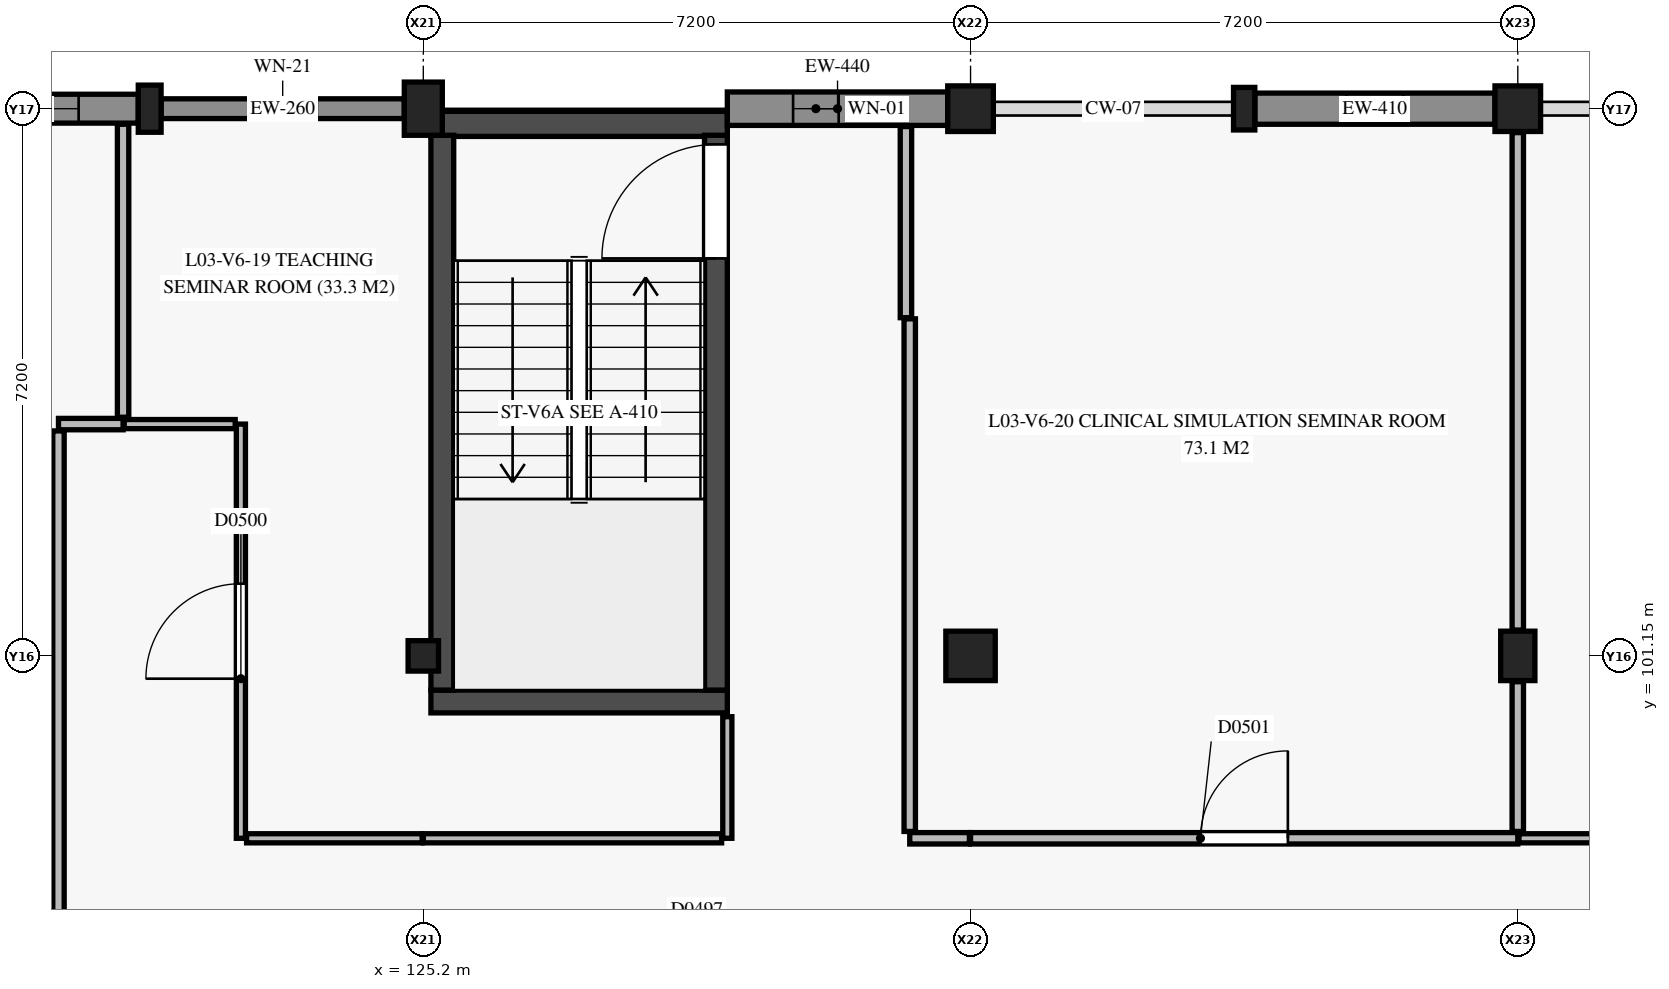
"""IFC4 building model, lengths in metres.
Left out: names, types, materials, properties, quantities, classifications, styles, units other than length and angle.
Written with IfcOpenShell. Run it as: python <this file> out.ifc"""

import sys

from ifc_helpers import new_model, si_unit, direction, frame, frame_2d, origin, origin_2d, place, context, subcontext, project, spatial, rectangle, circle, extrude, element, fill, save


model = new_model("IFC4")
c1 = context("Model", 3, precision=1e-05, world=origin(), true_north=direction((0.0, 1.0)))
c2 = subcontext(c1, "Body", "Model", "MODEL_VIEW")
j1 = project(units=[si_unit("LENGTHUNIT", "METRE"), si_unit("PLANEANGLEUNIT", "RADIAN")], contexts=[c1])
p1 = place(None, origin())
s1 = spatial("IfcSite", under=j1, at=p1, CompositionType="ELEMENT")
p2 = place(p1, origin())
s2 = spatial("IfcBuilding", under=s1, at=p2, CompositionType="ELEMENT")
p3 = place(p2, frame((0.0, 0.0, 13.2)))
s3 = spatial("IfcBuildingStorey", under=s2, at=p3, CompositionType="ELEMENT", Elevation=13.2)
p4 = place(p3, frame((125.2, 101.15, 0.0), z_axis=(0.0, 0.0, 1.0), x_axis=(1.0, 0.0, 0.0)))
e1 = element("IfcColumn", 1, at=p4, inside=s3, PredefinedType="COLUMN", context=c2, shape_type="SweptSolid", body=[
    extrude(rectangle(XDim=0.4, YDim=0.4, at=origin_2d()), origin(), (0.0, 0.0, 1.0), 4.2),
])
p5 = place(p3, frame((125.2, 108.35, 0.0), z_axis=(0.0, 0.0, 1.0), x_axis=(1.0, 0.0, 0.0)))
e2 = element("IfcColumn", 2, at=p5, inside=s3, PredefinedType="COLUMN", context=c2, shape_type="SweptSolid", body=[
    extrude(rectangle(XDim=0.5, YDim=0.7, at=origin_2d()), origin(), (0.0, 0.0, 1.0), 4.2),
])
p6 = place(p3, frame((132.4, 101.15, 0.0), z_axis=(0.0, 0.0, 1.0), x_axis=(1.0, 0.0, 0.0)))
e3 = element("IfcColumn", 3, at=p6, inside=s3, PredefinedType="COLUMN", context=c2, shape_type="SweptSolid", body=[
    extrude(rectangle(XDim=0.65, YDim=0.65, at=origin_2d()), origin(), (0.0, 0.0, 1.0), 4.2),
])
p7 = place(p3, frame((132.4, 108.35, 0.0), z_axis=(0.0, 0.0, 1.0), x_axis=(1.0, 0.0, 0.0)))
e4 = element("IfcColumn", 4, at=p7, inside=s3, PredefinedType="COLUMN", context=c2, shape_type="SweptSolid", body=[
    extrude(rectangle(XDim=0.6, YDim=0.6, at=origin_2d()), origin(), (0.0, 0.0, 1.0), 4.2),
])
p8 = place(p3, frame((139.6, 101.15, 0.0), z_axis=(0.0, 0.0, 1.0), x_axis=(1.0, 0.0, 0.0)))
e5 = element("IfcColumn", 5, at=p8, inside=s3, PredefinedType="COLUMN", context=c2, shape_type="SweptSolid", body=[
    extrude(rectangle(XDim=0.45, YDim=0.65, at=origin_2d()), origin(), (0.0, 0.0, 1.0), 4.05),
])
p9 = place(p3, frame((139.6, 108.35, 0.0), z_axis=(0.0, 0.0, 1.0), x_axis=(1.0, 0.0, 0.0)))
e6 = element("IfcColumn", 6, at=p9, inside=s3, PredefinedType="COLUMN", context=c2, shape_type="SweptSolid", body=[
    extrude(circle(Radius=0.3, at=origin_2d()), origin(), (0.0, 0.0, 1.0), 4.36),
])
p10 = place(p3, frame((121.6, 108.35, 0.0), z_axis=(0.0, 0.0, 1.0), x_axis=(1.0, 0.0, 0.0)))
e7 = element("IfcColumn", 7, at=p10, inside=s3, PredefinedType="PILASTER", context=c2, shape_type="SweptSolid", body=[
    extrude(rectangle(XDim=0.3, YDim=0.62, at=origin_2d()), origin(), (0.0, 0.0, 1.0), 4.2),
])
p11 = place(p3, frame((136.0, 108.35, 0.0), z_axis=(0.0, 0.0, 1.0), x_axis=(1.0, 0.0, 0.0)))
e8 = element("IfcColumn", 8, at=p11, inside=s3, PredefinedType="PILASTER", context=c2, shape_type="SweptSolid", body=[
    extrude(rectangle(XDim=0.28, YDim=0.56, at=origin_2d()), origin(), (0.0, 0.0, 1.0), 4.2),
])
p12 = place(p3, frame((125.3, 100.55, 0.0), z_axis=(0.0, 0.0, 1.0), x_axis=(1.0, 0.0, 0.0)))
e9 = element("IfcWall", 9, at=p12, inside=s3, PredefinedType="SHEAR", context=c2, shape_type="SweptSolid", body=[
    extrude(rectangle(XDim=3.9, YDim=0.3, at=frame_2d((1.95, 0.0))), origin(), (0.0, 0.0, 1.0), 3.95),
])
p13 = place(p3, frame((125.3, 108.15, 0.0), z_axis=(0.0, 0.0, 1.0), x_axis=(1.0, 0.0, 0.0)))
e10 = element("IfcWall", 10, at=p13, inside=s3, PredefinedType="SHEAR", context=c2, shape_type="SweptSolid", body=[
    extrude(rectangle(XDim=3.9, YDim=0.33, at=frame_2d((1.95, 0.0))), origin(), (0.0, 0.0, 1.0), 3.95),
])
p14 = place(p3, frame((125.45, 100.7, 0.0), z_axis=(0.0, 0.0, 1.0), x_axis=(0.0, 1.0, 0.0)))
e11 = element("IfcWall", 11, at=p14, inside=s3, PredefinedType="SHEAR", context=c2, shape_type="SweptSolid", body=[
    extrude(rectangle(XDim=7.3, YDim=0.3, at=frame_2d((3.65, 0.0))), origin(), (0.0, 0.0, 1.0), 3.95),
])
p15 = place(p3, frame((129.05, 100.7, 0.0), z_axis=(0.0, 0.0, 1.0), x_axis=(0.0, 1.0, 0.0)))
e12 = element("IfcWall", 12, at=p15, inside=s3, PredefinedType="SHEAR", context=c2, shape_type="SweptSolid", body=[
    extrude(rectangle(XDim=7.3, YDim=0.3, at=frame_2d((3.65, 0.0))), origin(), (0.0, 0.0, 1.0), 3.95),
])
p16 = place(p15, frame((5.68, 0.0, 0.0)))
e13 = element("IfcOpeningElement", 13, at=p16, cuts=e12, PredefinedType="OPENING", context=c2, shape_type="SweptSolid", body=[
    extrude(rectangle(XDim=1.5, YDim=2.15, at=frame_2d((0.75, 1.075))), frame((0.0, 0.16, 0.0), z_axis=(0.0, -1.0, 0.0), x_axis=(1.0, 0.0, 0.0)), (0.0, 0.0, 1.0), 0.32),
])
p17 = place(p3, frame((118.3, 108.35, 0.0), z_axis=(0.0, 0.0, 1.0), x_axis=(1.0, 0.0, 0.0)))
e14 = element("IfcWall", 14, at=p17, inside=s3, PredefinedType="USERDEFINED", context=c2, shape_type="SweptSolid", body=[
    extrude(rectangle(XDim=3.15, YDim=0.38, at=frame_2d((1.575, 0.0))), origin(), (0.0, 0.0, 1.0), 3.13),
])
p18 = place(p17, frame((0.565, 0.0, 0.9)))
e15 = element("IfcOpeningElement", 15, at=p18, cuts=e14, PredefinedType="OPENING", context=c2, shape_type="SweptSolid", body=[
    extrude(rectangle(XDim=1.8, YDim=0.9, at=frame_2d((0.9, 0.45))), frame((0.0, 0.2, 0.0), z_axis=(0.0, -1.0, 0.0), x_axis=(1.0, 0.0, 0.0)), (0.0, 0.0, 1.0), 0.4),
])
p19 = place(p3, frame((121.75, 108.35, 0.0), z_axis=(0.0, 0.0, 1.0), x_axis=(1.0, 0.0, 0.0)))
e16 = element("IfcWall", 16, at=p19, inside=s3, PredefinedType="SOLIDWALL", context=c2, shape_type="SweptSolid", body=[
    extrude(rectangle(XDim=3.2, YDim=0.26, at=frame_2d((1.6, 0.0))), origin(), (0.0, 0.0, 1.0), 3.13),
])
p20 = place(p19, frame((1.15, 0.0, 0.95)))
e17 = element("IfcOpeningElement", 17, at=p20, cuts=e16, PredefinedType="OPENING", context=c2, shape_type="SweptSolid", body=[
    extrude(rectangle(XDim=0.9, YDim=1.2, at=frame_2d((0.45, 0.6))), frame((0.0, 0.14, 0.0), z_axis=(0.0, -1.0, 0.0), x_axis=(1.0, 0.0, 0.0)), (0.0, 0.0, 1.0), 0.28),
])
p21 = place(p3, frame((129.2, 108.35, 0.0), z_axis=(0.0, 0.0, 1.0), x_axis=(1.0, 0.0, 0.0)))
e18 = element("IfcWall", 18, at=p21, inside=s3, PredefinedType="USERDEFINED", context=c2, shape_type="SweptSolid", body=[
    extrude(rectangle(XDim=2.9, YDim=0.44, at=frame_2d((1.45, 0.0))), origin(), (0.0, 0.0, 1.0), 3.13),
])
p22 = place(p21, frame((0.865, 0.0, 0.9)))
e19 = element("IfcOpeningElement", 19, at=p22, cuts=e18, PredefinedType="OPENING", context=c2, shape_type="SweptSolid", body=[
    extrude(rectangle(XDim=0.6, YDim=1.8, at=frame_2d((0.3, 0.9))), frame((0.0, 0.23, 0.0), z_axis=(0.0, -1.0, 0.0), x_axis=(1.0, 0.0, 0.0)), (0.0, 0.0, 1.0), 0.46),
])
p23 = place(p3, frame((136.14, 108.35, 0.0), z_axis=(0.0, 0.0, 1.0), x_axis=(1.0, 0.0, 0.0)))
e20 = element("IfcWall", 20, at=p23, inside=s3, PredefinedType="USERDEFINED", context=c2, shape_type="SweptSolid", body=[
    extrude(rectangle(XDim=3.16, YDim=0.41, at=frame_2d((1.58, 0.0))), origin(), (0.0, 0.0, 1.0), 3.13),
])
p24 = place(p23, frame((1.205, 0.0, 0.9)))
e21 = element("IfcOpeningElement", 21, at=p24, cuts=e20, PredefinedType="OPENING", context=c2, shape_type="SweptSolid", body=[
    extrude(rectangle(XDim=0.75, YDim=1.8, at=frame_2d((0.375, 0.9))), frame((0.0, 0.215, 0.0), z_axis=(0.0, -1.0, 0.0), x_axis=(1.0, 0.0, 0.0)), (0.0, 0.0, 1.0), 0.43),
])
p25 = place(p3, frame((120.4, 104.2, 0.0), z_axis=(0.0, 0.0, 1.0), x_axis=(1.0, 0.0, 0.0)))
e22 = element("IfcWall", 22, at=p25, inside=s3, PredefinedType="PARTITIONING", context=c2, shape_type="SweptSolid", body=[
    extrude(rectangle(XDim=0.85, YDim=0.15, at=frame_2d((0.425, 0.0))), origin(), (0.0, 0.0, 1.0), 3.95),
])
p26 = place(p3, frame((120.4, 87.1, 0.0), z_axis=(0.0, 0.0, 1.0), x_axis=(0.0, 1.0, 0.0)))
e23 = element("IfcWall", 23, at=p26, inside=s3, PredefinedType="PARTITIONING", context=c2, shape_type="SweptSolid", body=[
    extrude(rectangle(XDim=17.01, YDim=0.15, at=frame_2d((8.505, 0.0))), origin(), (0.0, 0.0, 1.0), 3.215),
])
p27 = place(p26, frame((7.93, 0.0, 0.0)))
e24 = element("IfcOpeningElement", 24, at=p27, cuts=e23, PredefinedType="OPENING", context=c2, shape_type="SweptSolid", body=[
    extrude(rectangle(XDim=1.15, YDim=2.15, at=frame_2d((0.575, 1.075))), frame((0.0, 0.085, 0.0), z_axis=(0.0, -1.0, 0.0), x_axis=(1.0, 0.0, 0.0)), (0.0, 0.0, 1.0), 0.17),
])
p28 = place(p3, frame((131.55, 105.6, 0.0), z_axis=(0.0, 0.0, 1.0), x_axis=(0.0, 1.0, 0.0)))
e25 = element("IfcWall", 25, at=p28, inside=s3, PredefinedType="PARTITIONING", context=c2, shape_type="SweptSolid", body=[
    extrude(rectangle(XDim=2.515, YDim=0.15, at=frame_2d((1.257, 0.0))), origin(), (0.0, 0.0, 1.0), 3.95),
])
p29 = place(p3, frame((132.4, 98.75, 0.0), z_axis=(0.0, 0.0, 1.0), x_axis=(1.0, 0.0, 0.0)))
e26 = element("IfcWall", 26, at=p29, inside=s3, PredefinedType="PARTITIONING", context=c2, shape_type="SweptSolid", body=[
    extrude(rectangle(XDim=7.2, YDim=0.15, at=frame_2d((3.6, 0.0))), origin(), (0.0, 0.0, 1.0), 3.355),
])
p30 = place(p29, frame((3.025, 0.0, 0.0)))
e27 = element("IfcOpeningElement", 27, at=p30, cuts=e26, PredefinedType="OPENING", context=c2, shape_type="SweptSolid", body=[
    extrude(rectangle(XDim=1.15, YDim=2.15, at=frame_2d((0.575, 1.075))), frame((0.0, 0.085, 0.0), z_axis=(0.0, -1.0, 0.0), x_axis=(1.0, 0.0, 0.0)), (0.0, 0.0, 1.0), 0.17),
])
p31 = place(p3, frame((131.6, 98.75, 0.0), z_axis=(0.0, 0.0, 1.0), x_axis=(1.0, 0.0, 0.0)))
e28 = element("IfcWall", 28, at=p31, inside=s3, PredefinedType="PARTITIONING", context=c2, shape_type="SweptSolid", body=[
    extrude(rectangle(XDim=0.785, YDim=0.15, at=frame_2d((0.393, 0.0))), origin(), (0.0, 0.0, 1.0), 3.355),
])
p32 = place(p3, frame((131.6, 98.84, 0.0), z_axis=(0.0, 0.0, 1.0), x_axis=(0.0, 1.0, 0.0)))
e29 = element("IfcWall", 29, at=p32, inside=s3, PredefinedType="PARTITIONING", context=c2, shape_type="SweptSolid", body=[
    extrude(rectangle(XDim=6.745, YDim=0.15, at=frame_2d((3.373, 0.0))), origin(), (0.0, 0.0, 1.0), 3.95),
])
p33 = place(p3, frame((139.615, 98.75, 0.0), z_axis=(0.0, 0.0, 1.0), x_axis=(1.0, 0.0, 0.0)))
e30 = element("IfcWall", 30, at=p33, inside=s3, PredefinedType="PARTITIONING", context=c2, shape_type="SweptSolid", body=[
    extrude(rectangle(XDim=4.71, YDim=0.12, at=frame_2d((2.355, 0.0))), origin(), (0.0, 0.0, 1.0), 3.95),
])
p34 = place(p3, frame((122.8, 98.75, 0.0), z_axis=(0.0, 0.0, 1.0), x_axis=(0.0, 1.0, 0.0)))
e31 = element("IfcWall", 31, at=p34, inside=s3, PredefinedType="PARTITIONING", context=c2, shape_type="SweptSolid", body=[
    extrude(rectangle(XDim=5.45, YDim=0.12, at=frame_2d((2.725, 0.0))), origin(), (0.0, 0.0, 1.0), 3.215),
])
p35 = place(p34, frame((2.1, 0.0, 0.0)))
e32 = element("IfcOpeningElement", 32, at=p35, cuts=e31, PredefinedType="OPENING", context=c2, shape_type="SweptSolid", body=[
    extrude(rectangle(XDim=1.25, YDim=2.15, at=frame_2d((0.625, 1.075))), frame((0.0, 0.07, 0.0), z_axis=(0.0, -1.0, 0.0), x_axis=(1.0, 0.0, 0.0)), (0.0, 0.0, 1.0), 0.14),
])
p36 = place(p3, frame((121.265, 104.2, 0.0), z_axis=(0.0, 0.0, 1.0), x_axis=(1.0, 0.0, 0.0)))
e33 = element("IfcWall", 33, at=p36, inside=s3, PredefinedType="PARTITIONING", context=c2, shape_type="SweptSolid", body=[
    extrude(rectangle(XDim=1.46, YDim=0.12, at=frame_2d((0.73, 0.0))), origin(), (0.0, 0.0, 1.0), 3.95),
])
p37 = place(p3, frame((129.2, 98.75, 0.0), z_axis=(0.0, 0.0, 1.0), x_axis=(0.0, 1.0, 0.0)))
e34 = element("IfcWall", 34, at=p37, inside=s3, PredefinedType="PARTITIONING", context=c2, shape_type="SweptSolid", body=[
    extrude(rectangle(XDim=1.6, YDim=0.12, at=frame_2d((0.8, 0.0))), origin(), (0.0, 0.0, 1.0), 3.515),
])
p38 = place(p3, frame((125.2, 98.75, 0.0), z_axis=(0.0, 0.0, 1.0), x_axis=(1.0, 0.0, 0.0)))
e35 = element("IfcWall", 35, at=p38, inside=s3, PredefinedType="PARTITIONING", context=c2, shape_type="SweptSolid", body=[
    extrude(rectangle(XDim=3.925, YDim=0.12, at=frame_2d((1.962, 0.0))), origin(), (0.0, 0.0, 1.0), 3.385),
])
p39 = place(p3, frame((122.875, 98.75, 0.0), z_axis=(0.0, 0.0, 1.0), x_axis=(1.0, 0.0, 0.0)))
e36 = element("IfcWall", 36, at=p39, inside=s3, PredefinedType="PARTITIONING", context=c2, shape_type="SweptSolid", body=[
    extrude(rectangle(XDim=2.31, YDim=0.12, at=frame_2d((1.155, 0.0))), origin(), (0.0, 0.0, 1.0), 3.385),
])
p40 = place(p3, frame((121.25, 104.29, 0.0), z_axis=(0.0, 0.0, 1.0), x_axis=(0.0, 1.0, 0.0)))
e37 = element("IfcWall", 37, at=p40, inside=s3, PredefinedType="PARTITIONING", context=c2, shape_type="SweptSolid", body=[
    extrude(rectangle(XDim=3.855, YDim=0.15, at=frame_2d((1.927, 0.0))), origin(), (0.0, 0.0, 1.0), 3.515),
])
p41 = place(p3, frame((139.6, 98.84, 0.0), z_axis=(0.0, 0.0, 1.0), x_axis=(0.0, 1.0, 0.0)))
e38 = element("IfcWall", 38, at=p41, inside=s3, PredefinedType="PARTITIONING", context=c2, shape_type="SweptSolid", body=[
    extrude(rectangle(XDim=1.97, YDim=0.15, at=frame_2d((0.985, 0.0))), origin(), (0.0, 0.0, 1.0), 3.95),
])
p42 = place(p3, frame((139.6, 101.49, 0.0), z_axis=(0.0, 0.0, 1.0), x_axis=(0.0, 1.0, 0.0)))
e39 = element("IfcWall", 39, at=p42, inside=s3, PredefinedType="PARTITIONING", context=c2, shape_type="SweptSolid", body=[
    extrude(rectangle(XDim=6.545, YDim=0.15, at=frame_2d((3.272, 0.0))), origin(), (0.0, 0.0, 1.0), 3.95),
])
p43 = place(p18, origin())
e40 = element("IfcWindow", 40, at=p43, inside=s3, PartitioningType="SINGLE_PANEL", PredefinedType="WINDOW", context=c2, shape_type="SweptSolid", body=[
    extrude(rectangle(XDim=1.8, YDim=0.9, at=frame_2d((0.9, 0.45))), frame((0.0, 0.03, 0.0), z_axis=(0.0, -1.0, 0.0), x_axis=(1.0, 0.0, 0.0)), (0.0, 0.0, 1.0), 0.06),
])
fill(e15, e40)
p44 = place(p20, origin())
e41 = element("IfcWindow", 41, at=p44, inside=s3, PartitioningType="SINGLE_PANEL", PredefinedType="WINDOW", context=c2, shape_type="SweptSolid", body=[
    extrude(rectangle(XDim=0.9, YDim=1.2, at=frame_2d((0.45, 0.6))), frame((0.0, 0.03, 0.0), z_axis=(0.0, -1.0, 0.0), x_axis=(1.0, 0.0, 0.0)), (0.0, 0.0, 1.0), 0.06),
])
fill(e17, e41)
p45 = place(p22, origin())
e42 = element("IfcWindow", 42, at=p45, inside=s3, PartitioningType="SINGLE_PANEL", PredefinedType="WINDOW", context=c2, shape_type="SweptSolid", body=[
    extrude(rectangle(XDim=0.6, YDim=1.8, at=frame_2d((0.3, 0.9))), frame((0.0, 0.03, 0.0), z_axis=(0.0, -1.0, 0.0), x_axis=(1.0, 0.0, 0.0)), (0.0, 0.0, 1.0), 0.06),
])
fill(e19, e42)
p46 = place(p24, origin())
e43 = element("IfcWindow", 43, at=p46, inside=s3, PartitioningType="SINGLE_PANEL", PredefinedType="WINDOW", context=c2, shape_type="SweptSolid", body=[
    extrude(rectangle(XDim=0.75, YDim=1.8, at=frame_2d((0.375, 0.9))), frame((0.0, 0.03, 0.0), z_axis=(0.0, -1.0, 0.0), x_axis=(1.0, 0.0, 0.0)), (0.0, 0.0, 1.0), 0.06),
])
fill(e21, e43)
p47 = place(p16, origin())
e44 = element("IfcDoor", 44, at=p47, inside=s3, OperationType="SINGLE_SWING_LEFT", PredefinedType="DOOR", context=c2, shape_type="SweptSolid", body=[
    extrude(rectangle(XDim=1.5, YDim=2.15, at=frame_2d((0.75, 1.075))), frame((0.0, 0.025, 0.0), z_axis=(0.0, -1.0, 0.0), x_axis=(1.0, 0.0, 0.0)), (0.0, 0.0, 1.0), 0.05),
])
fill(e13, e44)
p48 = place(p35, origin())
e45 = element("IfcDoor", 45, at=p48, inside=s3, OperationType="SINGLE_SWING_LEFT", PredefinedType="DOOR", context=c2, shape_type="SweptSolid", body=[
    extrude(rectangle(XDim=1.25, YDim=2.15, at=frame_2d((0.625, 1.075))), frame((0.0, 0.025, 0.0), z_axis=(0.0, -1.0, 0.0), x_axis=(1.0, 0.0, 0.0)), (0.0, 0.0, 1.0), 0.05),
])
fill(e32, e45)
p49 = place(p30, origin())
e46 = element("IfcDoor", 46, at=p49, inside=s3, OperationType="SINGLE_SWING_RIGHT", PredefinedType="DOOR", context=c2, shape_type="SweptSolid", body=[
    extrude(rectangle(XDim=1.15, YDim=2.15, at=frame_2d((0.575, 1.075))), frame((0.0, 0.025, 0.0), z_axis=(0.0, -1.0, 0.0), x_axis=(1.0, 0.0, 0.0)), (0.0, 0.0, 1.0), 0.05),
])
fill(e27, e46)
save(model, sys.argv[1])
